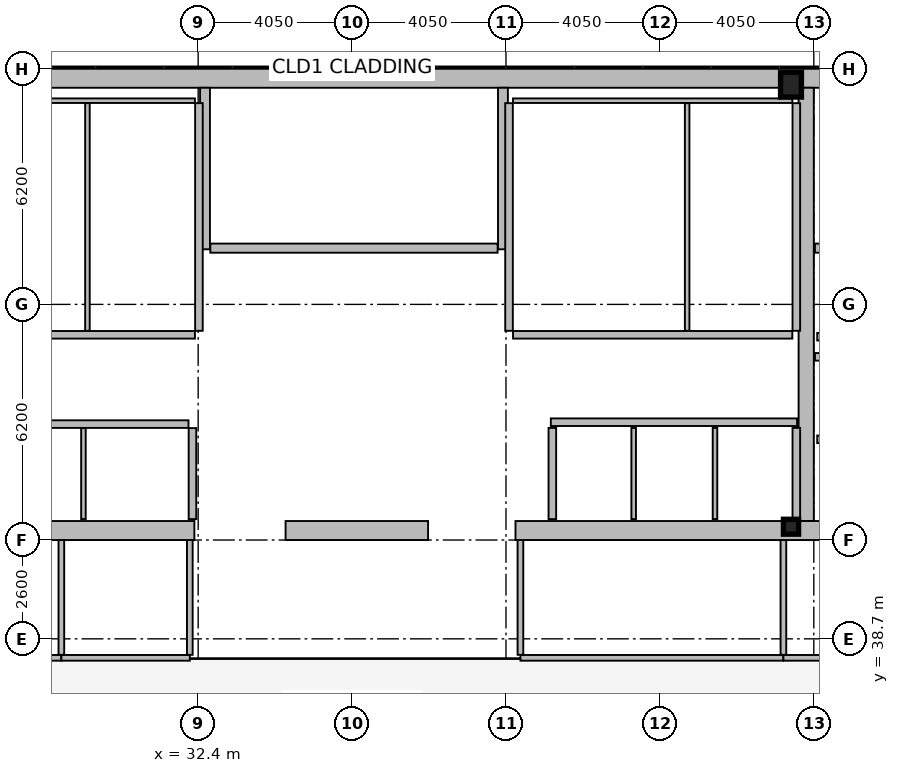
"""IFC4 building model, lengths in metres.
Left out: names, types, materials, properties, quantities, classifications, styles, units other than length and angle.
Written with IfcOpenShell. Run it as: python <this file> out.ifc"""

import sys

from ifc_helpers import new_model, si_unit, direction, frame, frame_2d, origin, origin_2d, place, context, subcontext, project, spatial, rectangle, hollow_rectangle, i_section, extrude, element, fill, save


model = new_model("IFC4")
c1 = context("Model", 3, precision=1e-05, world=origin(), true_north=direction((0.0, 1.0)))
c2 = subcontext(c1, "Body", "Model", "MODEL_VIEW")
j1 = project(units=[si_unit("LENGTHUNIT", "METRE"), si_unit("PLANEANGLEUNIT", "RADIAN")], contexts=[c1])
p1 = place(None, origin())
s1 = spatial("IfcSite", under=j1, at=p1, CompositionType="ELEMENT")
p2 = place(p1, origin())
s2 = spatial("IfcBuilding", under=s1, at=p2, CompositionType="ELEMENT")
p3 = place(p2, frame((0.0, 0.0, 329.0)))
s3 = spatial("IfcBuildingStorey", under=s2, at=p3, CompositionType="ELEMENT", Elevation=329.0)
p4 = place(p3, frame((16.2, 53.45, 0.0), z_axis=(0.0, 0.0, 1.0), x_axis=(1.0, 0.0, 0.0)))
e1 = element("IfcWall", 1, at=p4, inside=s3, PredefinedType="SHEAR", context=c2, shape_type="SweptSolid", body=[
    extrude(rectangle(XDim=40.5, YDim=0.5, at=frame_2d((20.25, 0.0))), origin(), (0.0, 0.0, 1.0), 3.44),
])
p5 = place(p3, frame((48.4, 41.8, 0.0), z_axis=(0.0, 0.0, 1.0), x_axis=(0.0, 1.0, 0.0)))
e2 = element("IfcWall", 2, at=p5, inside=s3, PredefinedType="SHEAR", context=c2, shape_type="SweptSolid", body=[
    extrude(rectangle(XDim=11.4, YDim=0.4, at=frame_2d((5.7, 0.0))), origin(), (0.0, 0.0, 1.0), 3.44),
])
p6 = place(p3, frame((32.3, 41.55, 0.0), z_axis=(0.0, 0.0, 1.0), x_axis=(-1.0, 0.0, 0.0)))
e3 = element("IfcWall", 3, at=p6, inside=s3, PredefinedType="SHEAR", context=c2, shape_type="SweptSolid", body=[
    extrude(rectangle(XDim=11.45, YDim=0.5, at=frame_2d((5.725, 0.0))), origin(), (0.0, 0.0, 1.0), 3.44),
])
p7 = place(p3, frame((38.45, 41.55, 0.0), z_axis=(0.0, 0.0, 1.0), x_axis=(-1.0, 0.0, 0.0)))
e4 = element("IfcWall", 4, at=p7, inside=s3, PredefinedType="SHEAR", context=c2, shape_type="SweptSolid", body=[
    extrude(rectangle(XDim=3.75, YDim=0.5, at=frame_2d((1.875, 0.0))), origin(), (0.0, 0.0, 1.0), 3.44),
])
p8 = place(p3, frame((52.05, 41.55, 0.0), z_axis=(0.0, 0.0, 1.0), x_axis=(-1.0, 0.0, 0.0)))
e5 = element("IfcWall", 5, at=p8, inside=s3, PredefinedType="SHEAR", context=c2, shape_type="SweptSolid", body=[
    extrude(rectangle(XDim=11.3, YDim=0.5, at=frame_2d((5.65, 0.0))), origin(), (0.0, 0.0, 1.0), 3.44),
])
for number, where, z_axis, x_axis in (
    (6, (32.58, 48.95, 0.0), (0.0, 0.0, 1.0), (0.0, 1.0, 0.0)),
    (7, (40.42, 48.95, 0.0), (0.0, 0.0, 1.0), (0.0, 1.0, 0.0)),
):
    element("IfcWall", number, at=place(p3, frame(where, z_axis=z_axis, x_axis=x_axis)), inside=s3, PredefinedType="SHEAR", context=c2, shape_type="SweptSolid", body=[
        extrude(rectangle(XDim=4.25, YDim=0.26, at=frame_2d((2.125, 0.0))), origin(), (0.0, 0.0, 1.0), 3.44),
    ])
p9 = place(p3, frame((48.63, 48.98, 0.0), z_axis=(0.0, 0.0, 1.0), x_axis=(1.0, 0.0, 0.0)))
e8 = element("IfcWall", 8, at=p9, inside=s3, PredefinedType="SHEAR", context=c2, shape_type="SweptSolid", body=[
    extrude(rectangle(XDim=7.57, YDim=0.24, at=frame_2d((3.785, 0.0))), origin(), (0.0, 0.0, 1.0), 3.44),
])
p10 = place(p9, frame((6.3, 0.0, 0.0)))
e9 = element("IfcOpeningElement", 9, at=p10, cuts=e8, PredefinedType="OPENING", context=c2, shape_type="SweptSolid", body=[
    extrude(rectangle(XDim=1.05, YDim=2.15, at=frame_2d((0.525, 1.075))), frame((0.0, 0.13, 0.0), z_axis=(0.0, -1.0, 0.0), x_axis=(1.0, 0.0, 0.0)), (0.0, 0.0, 1.0), 0.26),
])
p11 = place(p3, frame((32.72, 48.98, 0.0), z_axis=(0.0, 0.0, 1.0), x_axis=(1.0, 0.0, 0.0)))
e10 = element("IfcWall", 10, at=p11, inside=s3, PredefinedType="SHEAR", context=c2, shape_type="SweptSolid", body=[
    extrude(rectangle(XDim=7.56, YDim=0.24, at=frame_2d((3.78, 0.0))), origin(), (0.0, 0.0, 1.0), 3.44),
])
p12 = place(p11, frame((0.22, 0.0, 0.0)))
e11 = element("IfcOpeningElement", 11, at=p12, cuts=e10, PredefinedType="OPENING", context=c2, shape_type="SweptSolid", body=[
    extrude(rectangle(XDim=1.05, YDim=2.15, at=frame_2d((0.525, 1.075))), frame((0.0, 0.13, 0.0), z_axis=(0.0, -1.0, 0.0), x_axis=(1.0, 0.0, 0.0)), (0.0, 0.0, 1.0), 0.26),
])
p13 = place(p3, frame((48.0, 53.28, 0.0), z_axis=(0.0, 0.0, 1.0), x_axis=(1.0, 0.0, 0.0)))
e12 = element("IfcColumn", 12, at=p13, inside=s3, PredefinedType="COLUMN", context=c2, shape_type="SweptSolid", body=[
    extrude(hollow_rectangle(XDim=0.55, YDim=0.65, WallThickness=0.04, at=origin_2d()), origin(), (0.0, 0.0, 1.0), 3.6),
])
p14 = place(p3, frame((48.0, 41.65, 0.0), z_axis=(0.0, 0.0, 1.0), x_axis=(1.0, 0.0, 0.0)))
e13 = element("IfcColumn", 13, at=p14, inside=s3, PredefinedType="COLUMN", context=c2, shape_type="SweptSolid", body=[
    extrude(i_section(OverallWidth=0.399, OverallDepth=0.393, WebThickness=0.023, FlangeThickness=0.037, at=origin_2d()), origin(), (0.0, 0.0, 1.0), 3.6),
])
p15 = place(p3, frame((41.68, 44.4, 0.0), z_axis=(0.0, 0.0, 1.0), x_axis=(1.0, 0.0, 0.0)))
e14 = element("IfcWall", 14, at=p15, inside=s3, PredefinedType="PARTITIONING", context=c2, shape_type="SweptSolid", body=[
    extrude(rectangle(XDim=6.48, YDim=0.2, at=frame_2d((3.24, 0.0))), origin(), (0.0, 0.0, 1.0), 3.44),
])
p16 = place(p15, frame((0.58, 0.0, 0.0)))
e15 = element("IfcOpeningElement", 15, at=p16, cuts=e14, PredefinedType="OPENING", context=c2, shape_type="SweptSolid", body=[
    extrude(rectangle(XDim=1.1, YDim=2.18, at=frame_2d((0.55, 1.09))), frame((0.0, 0.11, 0.0), z_axis=(0.0, -1.0, 0.0), x_axis=(1.0, 0.0, 0.0)), (0.0, 0.0, 1.0), 0.22),
])
p17 = place(p15, frame((2.74, 0.0, 0.0)))
e16 = element("IfcOpeningElement", 16, at=p17, cuts=e14, PredefinedType="OPENING", context=c2, shape_type="SweptSolid", body=[
    extrude(rectangle(XDim=1.1, YDim=2.18, at=frame_2d((0.55, 1.09))), frame((0.0, 0.11, 0.0), z_axis=(0.0, -1.0, 0.0), x_axis=(1.0, 0.0, 0.0)), (0.0, 0.0, 1.0), 0.22),
])
p18 = place(p15, frame((4.9, 0.0, 0.0)))
e17 = element("IfcOpeningElement", 17, at=p18, cuts=e14, PredefinedType="OPENING", context=c2, shape_type="SweptSolid", body=[
    extrude(rectangle(XDim=1.1, YDim=2.18, at=frame_2d((0.55, 1.09))), frame((0.0, 0.11, 0.0), z_axis=(0.0, -1.0, 0.0), x_axis=(1.0, 0.0, 0.0)), (0.0, 0.0, 1.0), 0.22),
])
p19 = place(p3, frame((51.61, 43.95, 0.0), z_axis=(0.0, 0.0, 1.0), x_axis=(-1.0, 0.0, 0.0)))
e18 = element("IfcWall", 18, at=p19, inside=s3, PredefinedType="PARTITIONING", context=c2, shape_type="SweptSolid", body=[
    extrude(rectangle(XDim=2.92, YDim=0.2, at=frame_2d((1.46, 0.0))), origin(), (0.0, 0.0, 1.0), 3.44),
])
p20 = place(p19, frame((0.81, 0.0, 0.0)))
e19 = element("IfcOpeningElement", 19, at=p20, cuts=e18, PredefinedType="OPENING", context=c2, shape_type="SweptSolid", body=[
    extrude(rectangle(XDim=1.3, YDim=2.18, at=frame_2d((0.65, 1.09))), frame((0.0, 0.11, 0.0), z_axis=(0.0, -1.0, 0.0), x_axis=(1.0, 0.0, 0.0)), (0.0, 0.0, 1.0), 0.22),
])
p21 = place(p3, frame((51.61, 46.65, 0.0), z_axis=(0.0, 0.0, 1.0), x_axis=(-1.0, 0.0, 0.0)))
e20 = element("IfcWall", 20, at=p21, inside=s3, PredefinedType="PARTITIONING", context=c2, shape_type="SweptSolid", body=[
    extrude(rectangle(XDim=2.92, YDim=0.2, at=frame_2d((1.46, 0.0))), origin(), (0.0, 0.0, 1.0), 3.44),
])
p22 = place(p21, frame((0.86, 0.0, 0.0)))
e21 = element("IfcOpeningElement", 21, at=p22, cuts=e20, PredefinedType="OPENING", context=c2, shape_type="SweptSolid", body=[
    extrude(rectangle(XDim=1.2, YDim=2.18, at=frame_2d((0.6, 1.09))), frame((0.0, 0.11, 0.0), z_axis=(0.0, -1.0, 0.0), x_axis=(1.0, 0.0, 0.0)), (0.0, 0.0, 1.0), 0.22),
])
p23 = place(p3, frame((48.63, 46.12, 0.0), z_axis=(0.0, 0.0, 1.0), x_axis=(1.0, 0.0, 0.0)))
e22 = element("IfcWall", 22, at=p23, inside=s3, PredefinedType="PARTITIONING", context=c2, shape_type="SweptSolid", body=[
    extrude(rectangle(XDim=3.07, YDim=0.2, at=frame_2d((1.535, 0.0))), origin(), (0.0, 0.0, 1.0), 3.44),
])
p24 = place(p3, frame((32.42, 46.805, 0.0), z_axis=(0.0, 0.0, 1.0), x_axis=(0.0, 1.0, 0.0)))
e23 = element("IfcWall", 23, at=p24, inside=s3, PredefinedType="PARTITIONING", context=c2, shape_type="SweptSolid", body=[
    extrude(rectangle(XDim=5.99, YDim=0.2, at=frame_2d((2.995, 0.0))), origin(), (0.0, 0.0, 1.0), 3.44),
])
p25 = place(p3, frame((24.805, 52.86, 0.0), z_axis=(0.0, 0.0, 1.0), x_axis=(1.0, 0.0, 0.0)))
e24 = element("IfcWall", 24, at=p25, inside=s3, PredefinedType="PARTITIONING", context=c2, shape_type="SweptSolid", body=[
    extrude(rectangle(XDim=7.51, YDim=0.12, at=frame_2d((3.755, 0.0))), origin(), (0.0, 0.0, 1.0), 3.44),
])
p26 = place(p3, frame((29.486, 46.805, 0.0), z_axis=(0.0, 0.0, 1.0), x_axis=(0.0, 1.0, 0.0)))
e25 = element("IfcWall", 25, at=p26, inside=s3, PredefinedType="PARTITIONING", context=c2, shape_type="SweptSolid", body=[
    extrude(rectangle(XDim=5.99, YDim=0.12, at=frame_2d((2.995, 0.0))), origin(), (0.0, 0.0, 1.0), 3.44),
])
p27 = place(p3, frame((24.805, 46.7, 0.0), z_axis=(0.0, 0.0, 1.0), x_axis=(1.0, 0.0, 0.0)))
e26 = element("IfcWall", 26, at=p27, inside=s3, PredefinedType="PARTITIONING", context=c2, shape_type="SweptSolid", body=[
    extrude(rectangle(XDim=7.51, YDim=0.2, at=frame_2d((3.755, 0.0))), origin(), (0.0, 0.0, 1.0), 3.44),
])
p28 = place(p27, frame((1.15, 0.0, 0.0)))
e27 = element("IfcOpeningElement", 27, at=p28, cuts=e26, PredefinedType="OPENING", context=c2, shape_type="SweptSolid", body=[
    extrude(rectangle(XDim=0.95, YDim=2.1, at=frame_2d((0.475, 1.05))), frame((0.0, 0.11, 0.0), z_axis=(0.0, -1.0, 0.0), x_axis=(1.0, 0.0, 0.0)), (0.0, 0.0, 1.0), 0.22),
])
p29 = place(p27, frame((5.336, 0.0, 0.0)))
e28 = element("IfcOpeningElement", 28, at=p29, cuts=e26, PredefinedType="OPENING", context=c2, shape_type="SweptSolid", body=[
    extrude(rectangle(XDim=0.95, YDim=2.1, at=frame_2d((0.475, 1.05))), frame((0.0, 0.11, 0.0), z_axis=(0.0, -1.0, 0.0), x_axis=(1.0, 0.0, 0.0)), (0.0, 0.0, 1.0), 0.22),
])
p30 = place(p3, frame((32.25, 41.85, 0.0), z_axis=(0.0, 0.0, 1.0), x_axis=(0.0, 1.0, 0.0)))
e29 = element("IfcWall", 29, at=p30, inside=s3, PredefinedType="PARTITIONING", context=c2, shape_type="SweptSolid", body=[
    extrude(rectangle(XDim=2.395, YDim=0.2, at=frame_2d((1.198, 0.0))), origin(), (0.0, 0.0, 1.0), 3.44),
])
p31 = place(p3, frame((29.381, 41.85, 0.0), z_axis=(0.0, 0.0, 1.0), x_axis=(0.0, 1.0, 0.0)))
e30 = element("IfcWall", 30, at=p31, inside=s3, PredefinedType="PARTITIONING", context=c2, shape_type="SweptSolid", body=[
    extrude(rectangle(XDim=2.395, YDim=0.12, at=frame_2d((1.198, 0.0))), origin(), (0.0, 0.0, 1.0), 3.44),
])
p32 = place(p3, frame((24.805, 44.35, 0.0), z_axis=(0.0, 0.0, 1.0), x_axis=(1.0, 0.0, 0.0)))
e31 = element("IfcWall", 31, at=p32, inside=s3, PredefinedType="PARTITIONING", context=c2, shape_type="SweptSolid", body=[
    extrude(rectangle(XDim=7.34, YDim=0.2, at=frame_2d((3.67, 0.0))), origin(), (0.0, 0.0, 1.0), 3.44),
])
p33 = place(p32, frame((1.15, 0.0, 0.0)))
e32 = element("IfcOpeningElement", 32, at=p33, cuts=e31, PredefinedType="OPENING", context=c2, shape_type="SweptSolid", body=[
    extrude(rectangle(XDim=0.95, YDim=2.1, at=frame_2d((0.475, 1.05))), frame((0.0, 0.11, 0.0), z_axis=(0.0, -1.0, 0.0), x_axis=(1.0, 0.0, 0.0)), (0.0, 0.0, 1.0), 0.22),
])
p34 = place(p32, frame((5.231, 0.0, 0.0)))
e33 = element("IfcOpeningElement", 33, at=p34, cuts=e31, PredefinedType="OPENING", context=c2, shape_type="SweptSolid", body=[
    extrude(rectangle(XDim=0.95, YDim=2.1, at=frame_2d((0.475, 1.05))), frame((0.0, 0.11, 0.0), z_axis=(0.0, -1.0, 0.0), x_axis=(1.0, 0.0, 0.0)), (0.0, 0.0, 1.0), 0.22),
])
for number, where, z_axis, x_axis in (
    (34, (40.58, 46.805, 0.0), (0.0, 0.0, 1.0), (0.0, 1.0, 0.0)),
    (35, (48.14, 46.805, 0.0), (0.0, 0.0, 1.0), (0.0, 1.0, 0.0)),
):
    element("IfcWall", number, at=place(p3, frame(where, z_axis=z_axis, x_axis=x_axis)), inside=s3, PredefinedType="PARTITIONING", context=c2, shape_type="SweptSolid", body=[
        extrude(rectangle(XDim=5.99, YDim=0.2, at=frame_2d((2.995, 0.0))), origin(), (0.0, 0.0, 1.0), 3.44),
    ])
p35 = place(p3, frame((40.685, 52.86, 0.0), z_axis=(0.0, 0.0, 1.0), x_axis=(1.0, 0.0, 0.0)))
e36 = element("IfcWall", 36, at=p35, inside=s3, PredefinedType="PARTITIONING", context=c2, shape_type="SweptSolid", body=[
    extrude(rectangle(XDim=7.35, YDim=0.12, at=frame_2d((3.675, 0.0))), origin(), (0.0, 0.0, 1.0), 3.44),
])
p36 = place(p3, frame((45.267, 46.805, 0.0), z_axis=(0.0, 0.0, 1.0), x_axis=(0.0, 1.0, 0.0)))
e37 = element("IfcWall", 37, at=p36, inside=s3, PredefinedType="PARTITIONING", context=c2, shape_type="SweptSolid", body=[
    extrude(rectangle(XDim=5.99, YDim=0.12, at=frame_2d((2.995, 0.0))), origin(), (0.0, 0.0, 1.0), 3.44),
])
p37 = place(p3, frame((40.685, 46.7, 0.0), z_axis=(0.0, 0.0, 1.0), x_axis=(1.0, 0.0, 0.0)))
e38 = element("IfcWall", 38, at=p37, inside=s3, PredefinedType="PARTITIONING", context=c2, shape_type="SweptSolid", body=[
    extrude(rectangle(XDim=7.35, YDim=0.2, at=frame_2d((3.675, 0.0))), origin(), (0.0, 0.0, 1.0), 3.44),
])
p38 = place(p37, frame((1.15, 0.0, 0.0)))
e39 = element("IfcOpeningElement", 39, at=p38, cuts=e38, PredefinedType="OPENING", context=c2, shape_type="SweptSolid", body=[
    extrude(rectangle(XDim=0.95, YDim=2.1, at=frame_2d((0.475, 1.05))), frame((0.0, 0.11, 0.0), z_axis=(0.0, -1.0, 0.0), x_axis=(1.0, 0.0, 0.0)), (0.0, 0.0, 1.0), 0.22),
])
p39 = place(p37, frame((5.237, 0.0, 0.0)))
e40 = element("IfcOpeningElement", 40, at=p39, cuts=e38, PredefinedType="OPENING", context=c2, shape_type="SweptSolid", body=[
    extrude(rectangle(XDim=0.95, YDim=2.1, at=frame_2d((0.475, 1.05))), frame((0.0, 0.11, 0.0), z_axis=(0.0, -1.0, 0.0), x_axis=(1.0, 0.0, 0.0)), (0.0, 0.0, 1.0), 0.22),
])
for number, where, z_axis, x_axis in (
    (41, (41.72, 41.85, 0.0), (0.0, 0.0, 1.0), (0.0, 1.0, 0.0)),
    (42, (48.14, 41.85, 0.0), (0.0, 0.0, 1.0), (0.0, 1.0, 0.0)),
):
    element("IfcWall", number, at=place(p3, frame(where, z_axis=z_axis, x_axis=x_axis)), inside=s3, PredefinedType="PARTITIONING", context=c2, shape_type="SweptSolid", body=[
        extrude(rectangle(XDim=2.4, YDim=0.2, at=frame_2d((1.2, 0.0))), origin(), (0.0, 0.0, 1.0), 3.44),
    ])
for number, where, z_axis, x_axis in (
    (43, (43.86, 41.85, 0.0), (0.0, 0.0, 1.0), (0.0, 1.0, 0.0)),
    (44, (46.0, 41.85, 0.0), (0.0, 0.0, 1.0), (0.0, 1.0, 0.0)),
):
    element("IfcWall", number, at=place(p3, frame(where, z_axis=z_axis, x_axis=x_axis)), inside=s3, PredefinedType="PARTITIONING", context=c2, shape_type="SweptSolid", body=[
        extrude(rectangle(XDim=2.4, YDim=0.12, at=frame_2d((1.2, 0.0))), origin(), (0.0, 0.0, 1.0), 3.44),
    ])
p40 = place(p3, frame((25.5, 38.2, 0.0), z_axis=(0.0, 0.0, 1.0), x_axis=(1.0, 0.0, 0.0)))
e45 = element("IfcWall", 45, at=p40, inside=s3, PredefinedType="PARTITIONING", context=c2, shape_type="SweptSolid", body=[
    extrude(rectangle(XDim=3.3, YDim=0.15, at=frame_2d((1.65, 0.0))), origin(), (0.0, 0.0, 1.0), 3.44),
])
p41 = place(p40, frame((0.9, 0.0, 0.0)))
e46 = element("IfcOpeningElement", 46, at=p41, cuts=e45, PredefinedType="OPENING", context=c2, shape_type="SweptSolid", body=[
    extrude(rectangle(XDim=0.95, YDim=2.05, at=frame_2d((0.475, 1.025))), frame((0.0, 0.085, 0.0), z_axis=(0.0, -1.0, 0.0), x_axis=(1.0, 0.0, 0.0)), (0.0, 0.0, 1.0), 0.17),
])
p42 = place(p3, frame((28.8, 38.2, 0.0), z_axis=(0.0, 0.0, 1.0), x_axis=(1.0, 0.0, 0.0)))
e47 = element("IfcWall", 47, at=p42, inside=s3, PredefinedType="PARTITIONING", context=c2, shape_type="SweptSolid", body=[
    extrude(rectangle(XDim=3.38, YDim=0.15, at=frame_2d((1.69, 0.0))), origin(), (0.0, 0.0, 1.0), 3.44),
])
p43 = place(p42, frame((0.7, 0.0, 0.0)))
e48 = element("IfcOpeningElement", 48, at=p43, cuts=e47, PredefinedType="OPENING", context=c2, shape_type="SweptSolid", body=[
    extrude(rectangle(XDim=0.95, YDim=2.05, at=frame_2d((0.475, 1.025))), frame((0.0, 0.085, 0.0), z_axis=(0.0, -1.0, 0.0), x_axis=(1.0, 0.0, 0.0)), (0.0, 0.0, 1.0), 0.17),
])
for number, where, z_axis, x_axis in (
    (49, (28.8, 38.28, 0.0), (0.0, 0.0, 1.0), (0.0, 1.0, 0.0)),
    (50, (32.18, 38.28, 0.0), (0.0, 0.0, 1.0), (0.0, 1.0, 0.0)),
):
    element("IfcWall", number, at=place(p3, frame(where, z_axis=z_axis, x_axis=x_axis)), inside=s3, PredefinedType="PARTITIONING", context=c2, shape_type="SweptSolid", body=[
        extrude(rectangle(XDim=3.02, YDim=0.15, at=frame_2d((1.51, 0.0))), origin(), (0.0, 0.0, 1.0), 3.44),
    ])
p44 = place(p3, frame((40.88, 38.2, 0.0), z_axis=(0.0, 0.0, 1.0), x_axis=(1.0, 0.0, 0.0)))
e51 = element("IfcWall", 51, at=p44, inside=s3, PredefinedType="PARTITIONING", context=c2, shape_type="SweptSolid", body=[
    extrude(rectangle(XDim=6.92, YDim=0.15, at=frame_2d((3.46, 0.0))), origin(), (0.0, 0.0, 1.0), 2.83),
])
p45 = place(p44, frame((1.1, 0.0, 0.0)))
e52 = element("IfcOpeningElement", 52, at=p45, cuts=e51, PredefinedType="OPENING", context=c2, shape_type="SweptSolid", body=[
    extrude(rectangle(XDim=0.9, YDim=2.05, at=frame_2d((0.45, 1.025))), frame((0.0, 0.085, 0.0), z_axis=(0.0, -1.0, 0.0), x_axis=(1.0, 0.0, 0.0)), (0.0, 0.0, 1.0), 0.17),
])
p46 = place(p3, frame((47.8, 38.2, 0.0), z_axis=(0.0, 0.0, 1.0), x_axis=(1.0, 0.0, 0.0)))
e53 = element("IfcWall", 53, at=p46, inside=s3, PredefinedType="PARTITIONING", context=c2, shape_type="SweptSolid", body=[
    extrude(rectangle(XDim=4.15, YDim=0.15, at=frame_2d((2.075, 0.0))), origin(), (0.0, 0.0, 1.0), 2.83),
])
p47 = place(p46, frame((1.1, 0.0, 0.0)))
e54 = element("IfcOpeningElement", 54, at=p47, cuts=e53, PredefinedType="OPENING", context=c2, shape_type="SweptSolid", body=[
    extrude(rectangle(XDim=1.0, YDim=2.05, at=frame_2d((0.5, 1.025))), frame((0.0, 0.085, 0.0), z_axis=(0.0, -1.0, 0.0), x_axis=(1.0, 0.0, 0.0)), (0.0, 0.0, 1.0), 0.17),
])
p48 = place(p3, frame((40.88, 38.28, 0.0), z_axis=(0.0, 0.0, 1.0), x_axis=(0.0, 1.0, 0.0)))
e55 = element("IfcWall", 55, at=p48, inside=s3, PredefinedType="PARTITIONING", context=c2, shape_type="SweptSolid", body=[
    extrude(rectangle(XDim=3.02, YDim=0.15, at=frame_2d((1.51, 0.0))), origin(), (0.0, 0.0, 1.0), 3.44),
])
p49 = place(p3, frame((47.8, 38.28, 0.0), z_axis=(0.0, 0.0, 1.0), x_axis=(0.0, 1.0, 0.0)))
e56 = element("IfcWall", 56, at=p49, inside=s3, PredefinedType="PARTITIONING", context=c2, shape_type="SweptSolid", body=[
    extrude(rectangle(XDim=3.02, YDim=0.15, at=frame_2d((1.51, 0.0))), origin(), (0.0, 0.0, 1.0), 2.83),
])
p50 = place(p12, origin())
e57 = element("IfcDoor", 57, at=p50, inside=s3, OperationType="SINGLE_SWING_LEFT", PredefinedType="DOOR", context=c2, shape_type="SweptSolid", body=[
    extrude(rectangle(XDim=1.05, YDim=2.15, at=frame_2d((0.525, 1.075))), frame((0.0, 0.025, 0.0), z_axis=(0.0, -1.0, 0.0), x_axis=(1.0, 0.0, 0.0)), (0.0, 0.0, 1.0), 0.05),
])
fill(e11, e57)
p51 = place(p16, origin())
e58 = element("IfcDoor", 58, at=p51, inside=s3, OperationType="SLIDING_TO_LEFT", PredefinedType="DOOR", context=c2, shape_type="SweptSolid", body=[
    extrude(rectangle(XDim=1.1, YDim=2.18, at=frame_2d((0.55, 1.09))), frame((0.0, 0.025, 0.0), z_axis=(0.0, -1.0, 0.0), x_axis=(1.0, 0.0, 0.0)), (0.0, 0.0, 1.0), 0.05),
])
fill(e15, e58)
p52 = place(p17, origin())
e59 = element("IfcDoor", 59, at=p52, inside=s3, OperationType="SLIDING_TO_LEFT", PredefinedType="DOOR", context=c2, shape_type="SweptSolid", body=[
    extrude(rectangle(XDim=1.1, YDim=2.18, at=frame_2d((0.55, 1.09))), frame((0.0, 0.025, 0.0), z_axis=(0.0, -1.0, 0.0), x_axis=(1.0, 0.0, 0.0)), (0.0, 0.0, 1.0), 0.05),
])
fill(e16, e59)
p53 = place(p18, origin())
e60 = element("IfcDoor", 60, at=p53, inside=s3, OperationType="SLIDING_TO_LEFT", PredefinedType="DOOR", context=c2, shape_type="SweptSolid", body=[
    extrude(rectangle(XDim=1.1, YDim=2.18, at=frame_2d((0.55, 1.09))), frame((0.0, 0.025, 0.0), z_axis=(0.0, -1.0, 0.0), x_axis=(1.0, 0.0, 0.0)), (0.0, 0.0, 1.0), 0.05),
])
fill(e17, e60)
p54 = place(p29, origin())
e61 = element("IfcDoor", 61, at=p54, inside=s3, OperationType="SINGLE_SWING_LEFT", PredefinedType="DOOR", context=c2, shape_type="SweptSolid", body=[
    extrude(rectangle(XDim=0.95, YDim=2.1, at=frame_2d((0.475, 1.05))), frame((0.0, 0.025, 0.0), z_axis=(0.0, -1.0, 0.0), x_axis=(1.0, 0.0, 0.0)), (0.0, 0.0, 1.0), 0.05),
])
fill(e28, e61)
p55 = place(p34, origin())
e62 = element("IfcDoor", 62, at=p55, inside=s3, OperationType="SINGLE_SWING_LEFT", PredefinedType="DOOR", context=c2, shape_type="SweptSolid", body=[
    extrude(rectangle(XDim=0.95, YDim=2.1, at=frame_2d((0.475, 1.05))), frame((0.0, 0.025, 0.0), z_axis=(0.0, -1.0, 0.0), x_axis=(1.0, 0.0, 0.0)), (0.0, 0.0, 1.0), 0.05),
])
fill(e33, e62)
p56 = place(p38, origin())
e63 = element("IfcDoor", 63, at=p56, inside=s3, OperationType="SINGLE_SWING_RIGHT", PredefinedType="DOOR", context=c2, shape_type="SweptSolid", body=[
    extrude(rectangle(XDim=0.95, YDim=2.1, at=frame_2d((0.475, 1.05))), frame((0.0, 0.025, 0.0), z_axis=(0.0, -1.0, 0.0), x_axis=(1.0, 0.0, 0.0)), (0.0, 0.0, 1.0), 0.05),
])
fill(e39, e63)
p57 = place(p39, origin())
e64 = element("IfcDoor", 64, at=p57, inside=s3, OperationType="SINGLE_SWING_LEFT", PredefinedType="DOOR", context=c2, shape_type="SweptSolid", body=[
    extrude(rectangle(XDim=0.95, YDim=2.1, at=frame_2d((0.475, 1.05))), frame((0.0, 0.025, 0.0), z_axis=(0.0, -1.0, 0.0), x_axis=(1.0, 0.0, 0.0)), (0.0, 0.0, 1.0), 0.05),
])
fill(e40, e64)
p58 = place(p43, origin())
e65 = element("IfcDoor", 65, at=p58, inside=s3, OperationType="SINGLE_SWING_RIGHT", PredefinedType="DOOR", context=c2, shape_type="SweptSolid", body=[
    extrude(rectangle(XDim=0.95, YDim=2.05, at=frame_2d((0.475, 1.025))), frame((0.0, 0.025, 0.0), z_axis=(0.0, -1.0, 0.0), x_axis=(1.0, 0.0, 0.0)), (0.0, 0.0, 1.0), 0.05),
])
fill(e48, e65)
p59 = place(p45, origin())
e66 = element("IfcDoor", 66, at=p59, inside=s3, OperationType="SINGLE_SWING_LEFT", PredefinedType="DOOR", context=c2, shape_type="SweptSolid", body=[
    extrude(rectangle(XDim=0.9, YDim=2.05, at=frame_2d((0.45, 1.025))), frame((0.0, 0.025, 0.0), z_axis=(0.0, -1.0, 0.0), x_axis=(1.0, 0.0, 0.0)), (0.0, 0.0, 1.0), 0.05),
])
fill(e52, e66)
save(model, sys.argv[1])
